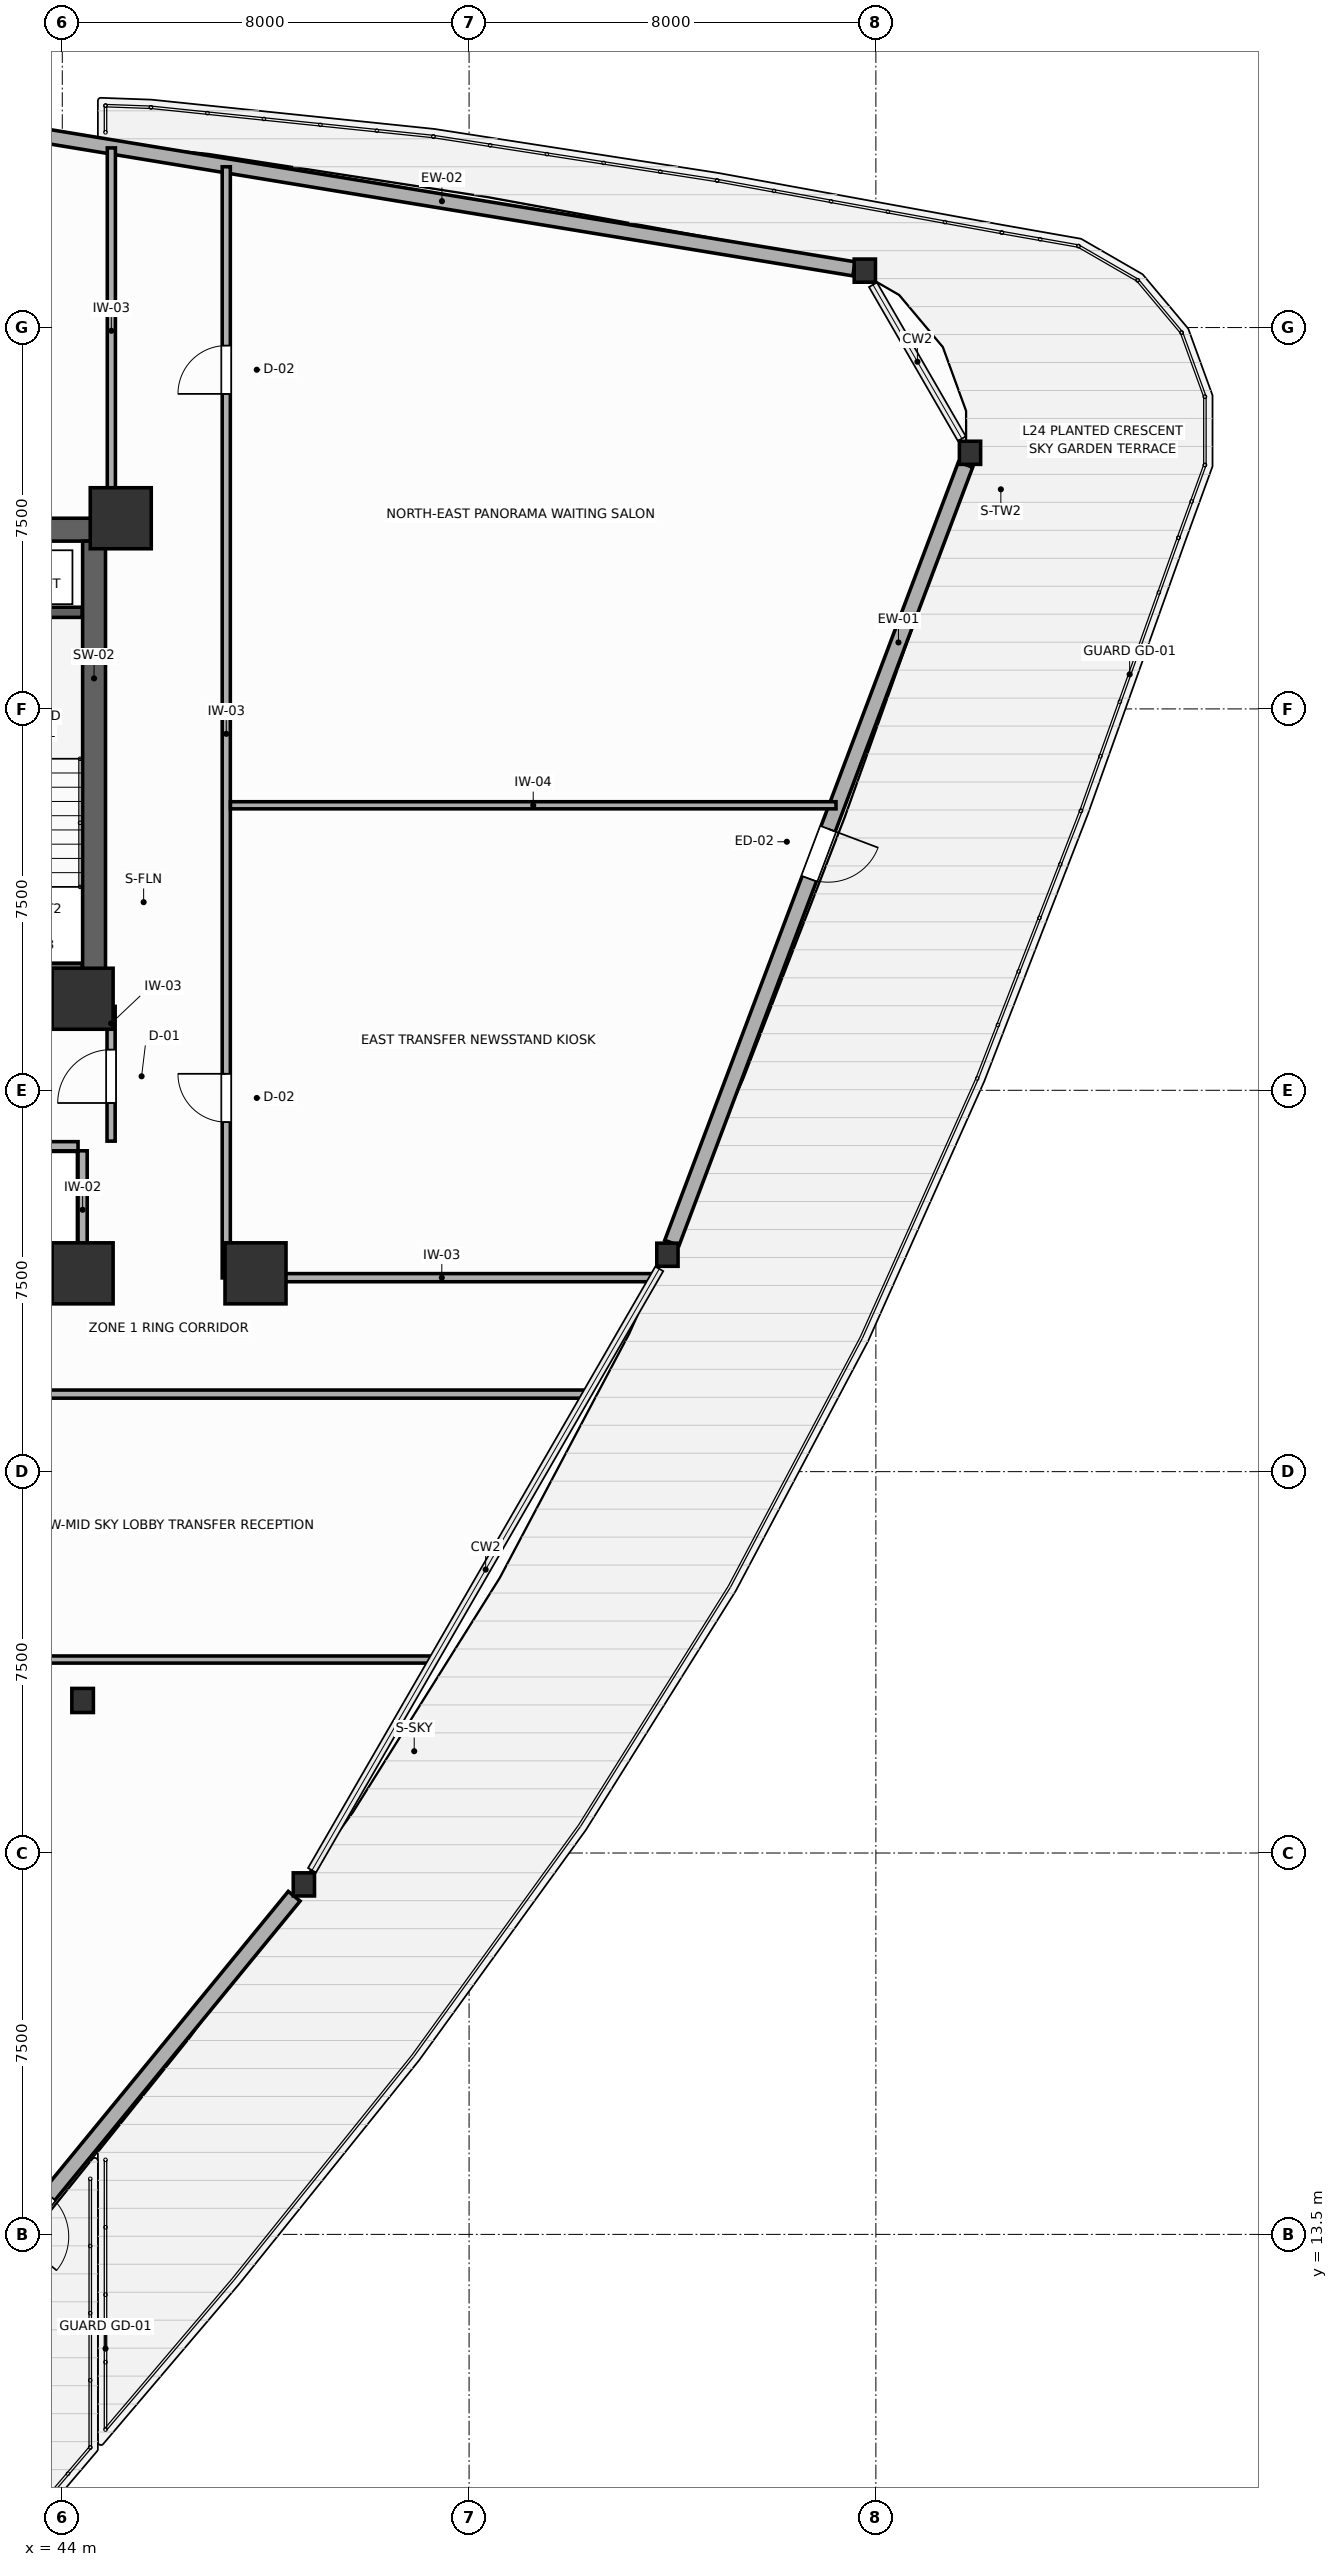
"""IFC4 building model, lengths in metres.
Left out: names, types, materials, properties, quantities, classifications, styles, units other than length and angle.
Written with IfcOpenShell. Run it as: python <this file> out.ifc"""

import sys

from ifc_helpers import new_model, si_unit, direction, frame, frame_2d, origin, origin_2d, place, context, subcontext, project, spatial, rectangle, i_section, extrude, source, transform, mapped, element, fill, save


model = new_model("IFC4")
c1 = context("Model", 3, precision=1e-05, world=origin(), true_north=direction((0.0, 1.0)))
c2 = subcontext(c1, "Body", "Model", "MODEL_VIEW")
j1 = project(units=[si_unit("LENGTHUNIT", "METRE"), si_unit("PLANEANGLEUNIT", "RADIAN")], contexts=[c1])
p1 = place(None, origin())
s1 = spatial("IfcSite", under=j1, at=p1, CompositionType="ELEMENT")
p2 = place(p1, origin())
s2 = spatial("IfcBuilding", under=s1, at=p2, CompositionType="ELEMENT")
p3 = place(p2, frame((0.0, 0.0, 99.0)))
s3 = spatial("IfcBuildingStorey", under=s2, at=p3, CompositionType="ELEMENT", Elevation=99.0)
p4 = place(p3, frame((27.15, 47.025, 0.0), z_axis=(0.0, 0.0, 1.0), x_axis=(1.0, 0.0, 0.0)))
e1 = element("IfcWall", 1, at=p4, inside=s3, PredefinedType="SHEAR", context=c2, shape_type="SweptSolid", body=[
    extrude(rectangle(XDim=17.7, YDim=0.45, at=frame_2d((8.85, 0.0))), origin(), (0.0, 0.0, 1.0), 3.6),
])
p5 = place(p3, frame((27.15, 37.575, 0.0), z_axis=(0.0, 0.0, 1.0), x_axis=(1.0, 0.0, 0.0)))
e2 = element("IfcWall", 2, at=p5, inside=s3, PredefinedType="SHEAR", context=c2, shape_type="SweptSolid", body=[
    extrude(rectangle(XDim=17.7, YDim=0.45, at=frame_2d((8.85, 0.0))), origin(), (0.0, 0.0, 1.0), 3.6),
])
p6 = place(p5, frame((4.875, 0.0, 0.0)))
e3 = element("IfcOpeningElement", 3, at=p6, cuts=e2, PredefinedType="OPENING", context=c2, shape_type="SweptSolid", body=[
    extrude(rectangle(XDim=1.05, YDim=2.1, at=frame_2d((0.525, 1.05))), frame((0.0, 0.235, 0.0), z_axis=(0.0, -1.0, 0.0), x_axis=(1.0, 0.0, 0.0)), (0.0, 0.0, 1.0), 0.47),
])
p7 = place(p5, frame((11.775, 0.0, 0.0)))
e4 = element("IfcOpeningElement", 4, at=p7, cuts=e2, PredefinedType="OPENING", context=c2, shape_type="SweptSolid", body=[
    extrude(rectangle(XDim=1.05, YDim=2.1, at=frame_2d((0.525, 1.05))), frame((0.0, 0.235, 0.0), z_axis=(0.0, -1.0, 0.0), x_axis=(1.0, 0.0, 0.0)), (0.0, 0.0, 1.0), 0.47),
])
p8 = place(p3, frame((44.625, 37.8, 0.0), z_axis=(0.0, 0.0, 1.0), x_axis=(0.0, 1.0, 0.0)))
e5 = element("IfcWall", 5, at=p8, inside=s3, PredefinedType="SHEAR", context=c2, shape_type="SweptSolid", body=[
    extrude(rectangle(XDim=9.0, YDim=0.45, at=frame_2d((4.5, 0.0))), origin(), (0.0, 0.0, 1.0), 3.6),
])
m1 = source(origin(), c2, "Body", "SweptSolid", [
    extrude(rectangle(XDim=1.2, YDim=1.2, at=origin_2d()), origin(), (0.0, 0.0, 1.0), 3.6),
])
for number, where, z_axis, x_axis in (
    (6, (45.15, 47.25, 0.0), (0.0, 0.0, 1.0), (1.0, 0.0, 0.0)),
    (7, (44.4, 37.8, 0.0), (0.0, 0.0, 1.0), (1.0, 0.0, 0.0)),
    (8, (44.4, 32.4, 0.0), (0.0, 0.0, 1.0), (1.0, 0.0, 0.0)),
    (9, (47.8, 32.4, 0.0), (0.0, 0.0, 1.0), (1.0, 0.0, 0.0)),
):
    element("IfcColumn", number, at=place(p3, frame(where, z_axis=z_axis, x_axis=x_axis)), inside=s3, PredefinedType="COLUMN", context=c2, shape_type="MappedRepresentation", body=[
        mapped(m1, transform((0.0, 0.0, 0.0), scale=1.0)),
    ])
m2 = source(origin(), c2, "Body", "SweptSolid", [
    extrude(i_section(OverallWidth=0.424, OverallDepth=0.474, WebThickness=0.045, FlangeThickness=0.072, FilletRadius=0.015, at=origin_2d()), origin(), (0.0, 0.0, 1.0), 3.6),
])
p9 = place(p3, frame((44.4, 24.0, 0.0), z_axis=(0.0, 0.0, 1.0), x_axis=(1.0, 0.0, 0.0)))
e10 = element("IfcColumn", 10, at=p9, inside=s3, PredefinedType="COLUMN", context=c2, shape_type="MappedRepresentation", body=[
    mapped(m2, transform((0.0, 0.0, 0.0), scale=1.0)),
])
m3 = source(origin(), c2, "Body", "SweptSolid", [
    extrude(i_section(OverallWidth=0.418, OverallDepth=0.455, WebThickness=0.039, FlangeThickness=0.063, FilletRadius=0.015, at=origin_2d()), origin(), (0.0, 0.0, 1.0), 3.6),
])
for number, where, z_axis, x_axis in (
    (11, (61.851, 48.537, 0.0), (0.0, 0.0, 1.0), (1.0, 0.0, 0.0)),
    (12, (59.783, 52.119, 0.0), (0.0, 0.0, 1.0), (1.0, 0.0, 0.0)),
    (13, (48.751, 20.383, 0.0), (0.0, 0.0, 1.0), (1.0, 0.0, 0.0)),
    (14, (55.901, 32.766, 0.0), (0.0, 0.0, 1.0), (1.0, 0.0, 0.0)),
):
    element("IfcColumn", number, at=place(p3, frame(where, z_axis=z_axis, x_axis=x_axis)), inside=s3, PredefinedType="COLUMN", context=c2, shape_type="MappedRepresentation", body=[
        mapped(m3, transform((0.0, 0.0, 0.0), scale=1.0)),
    ])
p10 = place(p3, frame((59.569, 52.155, 0.0), z_axis=(0.0, 0.0, 1.0), x_axis=(-0.986776921995, 0.162084256539, 0.0)))
e15 = element("IfcWall", 15, at=p10, inside=s3, PredefinedType="SOLIDWALL", context=c2, shape_type="SweptSolid", body=[
    extrude(rectangle(XDim=16.423, YDim=0.28, at=frame_2d((8.211, 0.0))), origin(), (0.0, 0.0, 1.0), 3.0),
])
p11 = place(p3, frame((38.259, 7.576, 0.0), z_axis=(0.0, 0.0, 1.0), x_axis=(0.633768446385, 0.773522822137, 0.0)))
e16 = element("IfcWall", 16, at=p11, inside=s3, PredefinedType="SOLIDWALL", context=c2, shape_type="SweptSolid", body=[
    extrude(rectangle(XDim=16.255, YDim=0.3, at=frame_2d((8.127, 0.0))), origin(), (0.0, 0.0, 1.0), 3.0),
])
p12 = place(p11, frame((7.603, 0.0, 0.0)))
e17 = element("IfcOpeningElement", 17, at=p12, cuts=e16, PredefinedType="OPENING", context=c2, shape_type="SweptSolid", body=[
    extrude(rectangle(XDim=1.05, YDim=2.1, at=frame_2d((0.525, 1.05))), frame((0.0, 0.16, 0.0), z_axis=(0.0, -1.0, 0.0), x_axis=(1.0, 0.0, 0.0)), (0.0, 0.0, 1.0), 0.32),
])
p13 = place(p3, frame((55.988, 32.998, 0.0), z_axis=(0.0, 0.0, 1.0), x_axis=(0.353021512356, 0.935615204993, 0.0)))
e18 = element("IfcWall", 18, at=p13, inside=s3, PredefinedType="SOLIDWALL", context=c2, shape_type="SweptSolid", body=[
    extrude(rectangle(XDim=16.359, YDim=0.3, at=frame_2d((8.18, 0.0))), origin(), (0.0, 0.0, 1.0), 3.0),
])
p14 = place(p13, frame((7.655, 0.0, 0.0)))
e19 = element("IfcOpeningElement", 19, at=p14, cuts=e18, PredefinedType="OPENING", context=c2, shape_type="SweptSolid", body=[
    extrude(rectangle(XDim=1.05, YDim=2.1, at=frame_2d((0.525, 1.05))), frame((0.0, 0.16, 0.0), z_axis=(0.0, -1.0, 0.0), x_axis=(1.0, 0.0, 0.0)), (0.0, 0.0, 1.0), 0.32),
])
for number, where, z_axis, x_axis in (
    (20, (41.25, 45.4, 0.0), (0.0, 0.0, 1.0), (1.0, 0.0, 0.0)),
    (21, (41.25, 38.4, 0.0), (0.0, 0.0, 1.0), (1.0, 0.0, 0.0)),
):
    element("IfcWall", number, at=place(p3, frame(where, z_axis=z_axis, x_axis=x_axis)), inside=s3, PredefinedType="SHEAR", context=c2, shape_type="SweptSolid", body=[
        extrude(rectangle(XDim=3.14, YDim=0.2, at=frame_2d((1.57, 0.0))), origin(), (0.0, 0.0, 1.0), 3.6),
    ])
p15 = place(p3, frame((42.39, 34.9, 0.0), z_axis=(0.0, 0.0, 1.0), x_axis=(1.0, 0.0, 0.0)))
e22 = element("IfcWall", 22, at=p15, inside=s3, PredefinedType="PARTITIONING", context=c2, shape_type="SweptSolid", body=[
    extrude(rectangle(XDim=1.92, YDim=0.18, at=frame_2d((0.96, 0.0))), origin(), (0.0, 0.0, 1.0), 3.4),
])
p16 = place(p3, frame((42.39, 32.4, 0.0), z_axis=(0.0, 0.0, 1.0), x_axis=(1.0, 0.0, 0.0)))
e23 = element("IfcWall", 23, at=p16, inside=s3, PredefinedType="PARTITIONING", context=c2, shape_type="SweptSolid", body=[
    extrude(rectangle(XDim=1.92, YDim=0.18, at=frame_2d((0.96, 0.0))), origin(), (0.0, 0.0, 1.0), 2.95),
])
p17 = place(p3, frame((44.4, 32.49, 0.0), z_axis=(0.0, 0.0, 1.0), x_axis=(0.0, 1.0, 0.0)))
e24 = element("IfcWall", 24, at=p17, inside=s3, PredefinedType="PARTITIONING", context=c2, shape_type="SweptSolid", body=[
    extrude(rectangle(XDim=2.32, YDim=0.18, at=frame_2d((1.16, 0.0))), origin(), (0.0, 0.0, 1.0), 3.4),
])
p18 = place(p3, frame((44.96, 35.0, 0.0), z_axis=(0.0, 0.0, 1.0), x_axis=(0.0, 1.0, 0.0)))
e25 = element("IfcWall", 25, at=p18, inside=s3, PredefinedType="PARTITIONING", context=c2, shape_type="SweptSolid", body=[
    extrude(rectangle(XDim=2.65, YDim=0.16, at=frame_2d((1.325, 0.0))), origin(), (0.0, 0.0, 1.0), 3.4),
])
p19 = place(p18, frame((0.75, 0.0, 0.0)))
e26 = element("IfcOpeningElement", 26, at=p19, cuts=e25, PredefinedType="OPENING", context=c2, shape_type="SweptSolid", body=[
    extrude(rectangle(XDim=1.05, YDim=2.1, at=frame_2d((0.525, 1.05))), frame((0.0, 0.09, 0.0), z_axis=(0.0, -1.0, 0.0), x_axis=(1.0, 0.0, 0.0)), (0.0, 0.0, 1.0), 0.18),
])
p20 = place(p3, frame((17.702, 30.025, 0.0), z_axis=(0.0, 0.0, 1.0), x_axis=(1.0, 0.0, 0.0)))
e27 = element("IfcWall", 27, at=p20, inside=s3, PredefinedType="PARTITIONING", context=c2, shape_type="SweptSolid", body=[
    extrude(rectangle(XDim=36.596, YDim=0.16, at=frame_2d((18.298, 0.0))), origin(), (0.0, 0.0, 1.0), 3.4),
])
p21 = place(p20, frame((14.283, 0.0, 0.0)))
e28 = element("IfcOpeningElement", 28, at=p21, cuts=e27, PredefinedType="OPENING", context=c2, shape_type="SweptSolid", body=[
    extrude(rectangle(XDim=0.95, YDim=2.05, at=frame_2d((0.475, 1.025))), frame((0.0, 0.09, 0.0), z_axis=(0.0, -1.0, 0.0), x_axis=(1.0, 0.0, 0.0)), (0.0, 0.0, 1.0), 0.18),
])
p22 = place(p20, frame((23.596, 0.0, 0.0)))
e29 = element("IfcOpeningElement", 29, at=p22, cuts=e27, PredefinedType="OPENING", context=c2, shape_type="SweptSolid", body=[
    extrude(rectangle(XDim=0.95, YDim=2.05, at=frame_2d((0.475, 1.025))), frame((0.0, 0.09, 0.0), z_axis=(0.0, -1.0, 0.0), x_axis=(1.0, 0.0, 0.0)), (0.0, 0.0, 1.0), 0.18),
])
p23 = place(p3, frame((47.225, 32.31, 0.0), z_axis=(0.0, 0.0, 1.0), x_axis=(0.0, 1.0, 0.0)))
e30 = element("IfcWall", 30, at=p23, inside=s3, PredefinedType="PARTITIONING", context=c2, shape_type="SweptSolid", body=[
    extrude(rectangle(XDim=21.852, YDim=0.16, at=frame_2d((10.926, 0.0))), origin(), (0.0, 0.0, 1.0), 3.4),
])
p24 = place(p23, frame((3.064, 0.0, 0.0)))
e31 = element("IfcOpeningElement", 31, at=p24, cuts=e30, PredefinedType="OPENING", context=c2, shape_type="SweptSolid", body=[
    extrude(rectangle(XDim=0.95, YDim=2.05, at=frame_2d((0.475, 1.025))), frame((0.0, 0.09, 0.0), z_axis=(0.0, -1.0, 0.0), x_axis=(1.0, 0.0, 0.0)), (0.0, 0.0, 1.0), 0.18),
])
p25 = place(p23, frame((17.385, 0.0, 0.0)))
e32 = element("IfcOpeningElement", 32, at=p25, cuts=e30, PredefinedType="OPENING", context=c2, shape_type="SweptSolid", body=[
    extrude(rectangle(XDim=0.95, YDim=2.05, at=frame_2d((0.475, 1.025))), frame((0.0, 0.09, 0.0), z_axis=(0.0, -1.0, 0.0), x_axis=(1.0, 0.0, 0.0)), (0.0, 0.0, 1.0), 0.18),
])
p26 = place(p3, frame((47.307, 32.315, 0.0), z_axis=(0.0, 0.0, 1.0), x_axis=(1.0, 0.0, 0.0)))
e33 = element("IfcWall", 33, at=p26, inside=s3, PredefinedType="PARTITIONING", context=c2, shape_type="SweptSolid", body=[
    extrude(rectangle(XDim=8.313, YDim=0.16, at=frame_2d((4.157, 0.0))), origin(), (0.0, 0.0, 1.0), 2.95),
])
p27 = place(p3, frame((44.965, 47.34, 0.0), z_axis=(0.0, 0.0, 1.0), x_axis=(0.0, 1.0, 0.0)))
e34 = element("IfcWall", 34, at=p27, inside=s3, PredefinedType="PARTITIONING", context=c2, shape_type="SweptSolid", body=[
    extrude(rectangle(XDim=7.193, YDim=0.16, at=frame_2d((3.597, 0.0))), origin(), (0.0, 0.0, 1.0), 2.95),
])
p28 = place(p3, frame((20.716, 24.805, 0.0), z_axis=(0.0, 0.0, 1.0), x_axis=(1.0, 0.0, 0.0)))
e35 = element("IfcWall", 35, at=p28, inside=s3, PredefinedType="PARTITIONING", context=c2, shape_type="SweptSolid", body=[
    extrude(rectangle(XDim=30.569, YDim=0.14, at=frame_2d((15.284, 0.0))), origin(), (0.0, 0.0, 1.0), 3.4),
])
p29 = place(p28, frame((11.221, 0.0, 0.0)))
e36 = element("IfcOpeningElement", 36, at=p29, cuts=e35, PredefinedType="OPENING", context=c2, shape_type="SweptSolid", body=[
    extrude(rectangle(XDim=0.95, YDim=2.05, at=frame_2d((0.475, 1.025))), frame((0.0, 0.08, 0.0), z_axis=(0.0, -1.0, 0.0), x_axis=(1.0, 0.0, 0.0)), (0.0, 0.0, 1.0), 0.16),
])
p30 = place(p3, frame((47.307, 41.605, 0.0), z_axis=(0.0, 0.0, 1.0), x_axis=(1.0, 0.0, 0.0)))
e37 = element("IfcWall", 37, at=p30, inside=s3, PredefinedType="PARTITIONING", context=c2, shape_type="SweptSolid", body=[
    extrude(rectangle(XDim=11.909, YDim=0.14, at=frame_2d((5.955, 0.0))), origin(), (0.0, 0.0, 1.0), 3.4),
])
p31 = place(p14, frame((1.05, 0.0, 0.0), z_axis=(0.0, 0.0, 1.0), x_axis=(-1.0, 0.0, 0.0)))
e38 = element("IfcDoor", 38, at=p31, inside=s3, OperationType="SINGLE_SWING_LEFT", PredefinedType="DOOR", context=c2, shape_type="SweptSolid", body=[
    extrude(rectangle(XDim=1.05, YDim=2.1, at=frame_2d((0.525, 1.05))), frame((0.0, 0.025, 0.0), z_axis=(0.0, -1.0, 0.0), x_axis=(1.0, 0.0, 0.0)), (0.0, 0.0, 1.0), 0.05),
])
fill(e19, e38)
p32 = place(p19, origin())
e39 = element("IfcDoor", 39, at=p32, inside=s3, OperationType="SINGLE_SWING_LEFT", PredefinedType="DOOR", context=c2, shape_type="SweptSolid", body=[
    extrude(rectangle(XDim=1.05, YDim=2.1, at=frame_2d((0.525, 1.05))), frame((0.0, 0.025, 0.0), z_axis=(0.0, -1.0, 0.0), x_axis=(1.0, 0.0, 0.0)), (0.0, 0.0, 1.0), 0.05),
])
fill(e26, e39)
p33 = place(p24, origin())
e40 = element("IfcDoor", 40, at=p33, inside=s3, OperationType="SINGLE_SWING_RIGHT", PredefinedType="DOOR", context=c2, shape_type="SweptSolid", body=[
    extrude(rectangle(XDim=0.95, YDim=2.05, at=frame_2d((0.475, 1.025))), frame((0.0, 0.025, 0.0), z_axis=(0.0, -1.0, 0.0), x_axis=(1.0, 0.0, 0.0)), (0.0, 0.0, 1.0), 0.05),
])
fill(e31, e40)
p34 = place(p25, origin())
e41 = element("IfcDoor", 41, at=p34, inside=s3, OperationType="SINGLE_SWING_LEFT", PredefinedType="DOOR", context=c2, shape_type="SweptSolid", body=[
    extrude(rectangle(XDim=0.95, YDim=2.05, at=frame_2d((0.475, 1.025))), frame((0.0, 0.025, 0.0), z_axis=(0.0, -1.0, 0.0), x_axis=(1.0, 0.0, 0.0)), (0.0, 0.0, 1.0), 0.05),
])
fill(e32, e41)
save(model, sys.argv[1])
